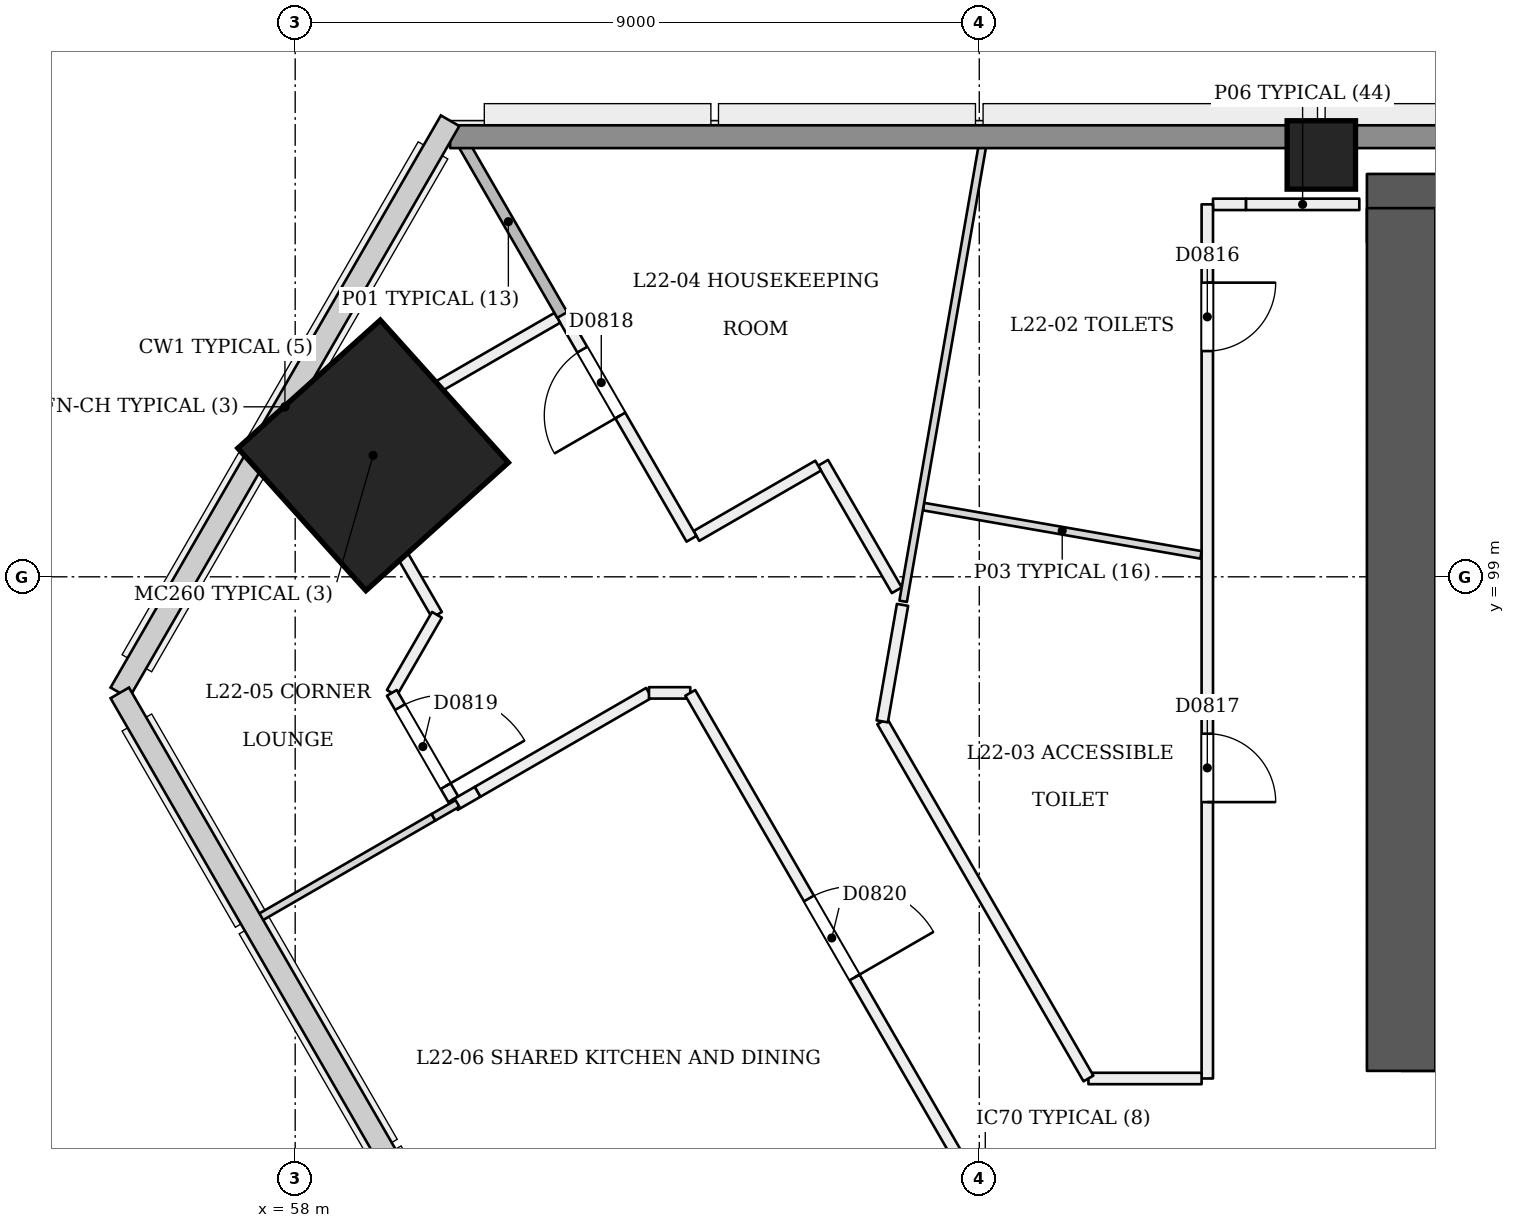
"""IFC4 building model, lengths in metres.
Left out: names, types, materials, properties, quantities, classifications, styles, units other than length and angle.
Written with IfcOpenShell. Run it as: python <this file> out.ifc"""

import sys

from ifc_helpers import new_model, si_unit, direction, frame, frame_2d, origin, origin_2d, place, context, subcontext, project, spatial, rectangle, extrude, element, fill, save


model = new_model("IFC4")
c1 = context("Model", 3, precision=1e-05, world=origin(), true_north=direction((0.0, 1.0)))
c2 = subcontext(c1, "Body", "Model", "MODEL_VIEW")
j1 = project(units=[si_unit("LENGTHUNIT", "METRE"), si_unit("PLANEANGLEUNIT", "RADIAN")], contexts=[c1])
p1 = place(None, origin())
s1 = spatial("IfcSite", under=j1, at=p1, CompositionType="ELEMENT")
p2 = place(p1, origin())
s2 = spatial("IfcBuilding", under=s1, at=p2, CompositionType="ELEMENT")
p3 = place(p2, frame((0.0, 0.0, 88.2)))
s3 = spatial("IfcBuildingStorey", under=s2, at=p3, CompositionType="ELEMENT", Elevation=88.2)
p4 = place(p3, frame((72.55, 92.95, 0.0), z_axis=(0.0, 0.0, 1.0), x_axis=(1.0, 0.0, 0.0)))
e1 = element("IfcWall", 1, at=p4, inside=s3, PredefinedType="SHEAR", context=c2, shape_type="SweptSolid", body=[
    extrude(rectangle(XDim=25.35, YDim=0.9, at=frame_2d((12.675, 0.0))), origin(), (0.0, 0.0, 1.0), 3.6),
])
p5 = place(p4, frame((1.25, 0.0, 0.0)))
e2 = element("IfcOpeningElement", 2, at=p5, cuts=e1, PredefinedType="OPENING", context=c2, shape_type="SweptSolid", body=[
    extrude(rectangle(XDim=1.2, YDim=2.1, at=frame_2d((0.6, 1.05))), frame((0.0, 0.46, 0.0), z_axis=(0.0, -1.0, 0.0), x_axis=(1.0, 0.0, 0.0)), (0.0, 0.0, 1.0), 0.921),
])
p6 = place(p4, frame((3.45, 0.0, 0.0)))
e3 = element("IfcOpeningElement", 3, at=p6, cuts=e1, PredefinedType="OPENING", context=c2, shape_type="SweptSolid", body=[
    extrude(rectangle(XDim=1.2, YDim=2.1, at=frame_2d((0.6, 1.05))), frame((0.0, 0.46, 0.0), z_axis=(0.0, -1.0, 0.0), x_axis=(1.0, 0.0, 0.0)), (0.0, 0.0, 1.0), 0.921),
])
p7 = place(p4, frame((13.45, 0.0, 0.0)))
e4 = element("IfcOpeningElement", 4, at=p7, cuts=e1, PredefinedType="OPENING", context=c2, shape_type="SweptSolid", body=[
    extrude(rectangle(XDim=1.2, YDim=2.1, at=frame_2d((0.6, 1.05))), frame((0.0, 0.46, 0.0), z_axis=(0.0, -1.0, 0.0), x_axis=(1.0, 0.0, 0.0)), (0.0, 0.0, 1.0), 0.921),
])
p8 = place(p4, frame((15.712, 0.0, 0.0)))
e5 = element("IfcOpeningElement", 5, at=p8, cuts=e1, PredefinedType="OPENING", context=c2, shape_type="SweptSolid", body=[
    extrude(rectangle(XDim=1.0, YDim=2.1, at=frame_2d((0.5, 1.05))), frame((0.0, 0.46, 0.0), z_axis=(0.0, -1.0, 0.0), x_axis=(1.0, 0.0, 0.0)), (0.0, 0.0, 1.0), 0.921),
])
p9 = place(p4, frame((18.35, 0.0, 0.0)))
e6 = element("IfcOpeningElement", 6, at=p9, cuts=e1, PredefinedType="OPENING", context=c2, shape_type="SweptSolid", body=[
    extrude(rectangle(XDim=1.0, YDim=2.1, at=frame_2d((0.5, 1.05))), frame((0.0, 0.46, 0.0), z_axis=(0.0, -1.0, 0.0), x_axis=(1.0, 0.0, 0.0)), (0.0, 0.0, 1.0), 0.921),
])
p10 = place(p4, frame((21.938, 0.0, 0.0)))
e7 = element("IfcOpeningElement", 7, at=p10, cuts=e1, PredefinedType="OPENING", context=c2, shape_type="SweptSolid", body=[
    extrude(rectangle(XDim=1.0, YDim=2.1, at=frame_2d((0.5, 1.05))), frame((0.0, 0.46, 0.0), z_axis=(0.0, -1.0, 0.0), x_axis=(1.0, 0.0, 0.0)), (0.0, 0.0, 1.0), 0.921),
])
p11 = place(p3, frame((97.45, 103.85, 0.0), z_axis=(0.0, 0.0, 1.0), x_axis=(-1.0, 0.0, 0.0)))
e8 = element("IfcWall", 8, at=p11, inside=s3, PredefinedType="SHEAR", context=c2, shape_type="SweptSolid", body=[
    extrude(rectangle(XDim=25.35, YDim=0.9, at=frame_2d((12.675, 0.0))), origin(), (0.0, 0.0, 1.0), 3.6),
])
p12 = place(p3, frame((72.55, 103.85, 0.0), z_axis=(0.0, 0.0, 1.0), x_axis=(0.0, -1.0, 0.0)))
e9 = element("IfcWall", 9, at=p12, inside=s3, PredefinedType="SHEAR", context=c2, shape_type="SweptSolid", body=[
    extrude(rectangle(XDim=11.35, YDim=0.9, at=frame_2d((5.675, 0.0))), origin(), (0.0, 0.0, 1.0), 3.6),
])
p13 = place(p3, frame((58.991, 100.586, 0.0), z_axis=(0.028401796786, 0.009286506348, 0.999553449666), x_axis=(-0.86620189855, 0.499294816778, 0.019973905167)))
e10 = element("IfcColumn", 10, at=p13, inside=s3, PredefinedType="COLUMN", context=c2, shape_type="SweptSolid", body=[
    extrude(rectangle(XDim=2.52, YDim=2.52, at=origin_2d()), origin(), (0.0, 0.0, 1.0), 3.602),
])
p14 = place(p3, frame((71.5, 104.55, 0.0), z_axis=(0.0, 0.0, 1.0), x_axis=(1.0, 0.0, 0.0)))
e11 = element("IfcColumn", 11, at=p14, inside=s3, PredefinedType="COLUMN", context=c2, shape_type="SweptSolid", body=[
    extrude(rectangle(XDim=0.9, YDim=0.9, at=origin_2d()), origin(), (0.0, 0.0, 1.0), 3.6),
])
p15 = place(p3, frame((72.0, 103.9, 0.0), z_axis=(0.0, 0.0, 1.0), x_axis=(-1.0, 0.0, 0.0)))
e12 = element("IfcWall", 12, at=p15, inside=s3, PredefinedType="PARTITIONING", context=c2, shape_type="SweptSolid", body=[
    extrude(rectangle(XDim=1.492, YDim=0.15, at=frame_2d((0.746, 0.0))), origin(), (0.0, 0.0, 1.0), 3.1),
])
p16 = place(p3, frame((70.508, 103.9, 0.0), z_axis=(0.0, 0.0, 1.0), x_axis=(-1.0, 0.0, 0.0)))
e13 = element("IfcWall", 13, at=p16, inside=s3, PredefinedType="PARTITIONING", context=c2, shape_type="SweptSolid", body=[
    extrude(rectangle(XDim=0.433, YDim=0.15, at=frame_2d((0.216, 0.0))), origin(), (0.0, 0.0, 1.0), 2.6),
])
p17 = place(p3, frame((70.0, 103.9, 0.0), z_axis=(0.0, 0.0, 1.0), x_axis=(0.0, -1.0, 0.0)))
e14 = element("IfcWall", 14, at=p17, inside=s3, PredefinedType="PARTITIONING", context=c2, shape_type="SweptSolid", body=[
    extrude(rectangle(XDim=11.5, YDim=0.15, at=frame_2d((5.75, 0.0))), origin(), (0.0, 0.0, 1.0), 2.6),
])
p18 = place(p17, frame((1.03, 0.0, 0.0)))
e15 = element("IfcOpeningElement", 15, at=p18, cuts=e14, PredefinedType="OPENING", context=c2, shape_type="SweptSolid", body=[
    extrude(rectangle(XDim=0.9, YDim=2.1, at=frame_2d((0.45, 1.05))), frame((0.0, 0.085, 0.0), z_axis=(0.0, -1.0, 0.0), x_axis=(1.0, 0.0, 0.0)), (0.0, 0.0, 1.0), 0.171),
])
p19 = place(p17, frame((6.964, 0.0, 0.0)))
e16 = element("IfcOpeningElement", 16, at=p19, cuts=e14, PredefinedType="OPENING", context=c2, shape_type="SweptSolid", body=[
    extrude(rectangle(XDim=0.9, YDim=2.1, at=frame_2d((0.45, 1.05))), frame((0.0, 0.085, 0.0), z_axis=(0.0, -1.0, 0.0), x_axis=(1.0, 0.0, 0.0)), (0.0, 0.0, 1.0), 0.171),
])
p20 = place(p3, frame((69.925, 92.4, 0.0), z_axis=(0.0, 0.0, 1.0), x_axis=(-1.0, 0.0, 0.0)))
e17 = element("IfcWall", 17, at=p20, inside=s3, PredefinedType="PARTITIONING", context=c2, shape_type="SweptSolid", body=[
    extrude(rectangle(XDim=1.489, YDim=0.15, at=frame_2d((0.745, 0.0))), origin(), (0.0, 0.0, 1.0), 3.1),
])
p21 = place(p3, frame((68.436, 92.4, 0.0), z_axis=(0.0, 0.0, 1.0), x_axis=(-0.499982159162, 0.866035703952, 0.0)))
e18 = element("IfcWall", 18, at=p21, inside=s3, PredefinedType="PARTITIONING", context=c2, shape_type="SweptSolid", body=[
    extrude(rectangle(XDim=5.425, YDim=0.15, at=frame_2d((2.712, 0.0))), origin(), (0.0, 0.0, 1.0), 3.1),
])
p22 = place(p3, frame((65.724, 97.098, 0.0), z_axis=(0.0, 0.0, 1.0), x_axis=(0.17154650213, 0.985176023666, 0.0)))
e19 = element("IfcWall", 19, at=p22, inside=s3, PredefinedType="PARTITIONING", context=c2, shape_type="SweptSolid", body=[
    extrude(rectangle(XDim=1.555, YDim=0.15, at=frame_2d((0.778, 0.0))), origin(), (0.0, 0.0, 1.0), 3.1),
])
p23 = place(p3, frame((65.915, 98.823, 0.0), z_axis=(0.0, 0.0, 1.0), x_axis=(-0.500449803305, 0.86576555393, 0.0)))
e20 = element("IfcWall", 20, at=p23, inside=s3, PredefinedType="PARTITIONING", context=c2, shape_type="SweptSolid", body=[
    extrude(rectangle(XDim=1.937, YDim=0.15, at=frame_2d((0.968, 0.0))), origin(), (0.0, 0.0, 1.0), 3.1),
])
p24 = place(p3, frame((64.881, 100.462, 0.0), z_axis=(0.0, 0.0, 1.0), x_axis=(-0.866058118026, -0.49994333299, 0.0)))
e21 = element("IfcWall", 21, at=p24, inside=s3, PredefinedType="PARTITIONING", context=c2, shape_type="SweptSolid", body=[
    extrude(rectangle(XDim=1.85, YDim=0.15, at=frame_2d((0.925, 0.0))), origin(), (0.0, 0.0, 1.0), 3.1),
])
p25 = place(p3, frame((63.214, 99.5, 0.0), z_axis=(0.0, 0.0, 1.0), x_axis=(-0.50003140069, 0.866007273829, 0.0)))
e22 = element("IfcWall", 22, at=p25, inside=s3, PredefinedType="PARTITIONING", context=c2, shape_type="SweptSolid", body=[
    extrude(rectangle(XDim=3.42, YDim=0.15, at=frame_2d((1.71, 0.0))), origin(), (0.0, 0.0, 1.0), 2.6),
])
p26 = place(p25, frame((1.873, 0.0, 0.0)))
e23 = element("IfcOpeningElement", 23, at=p26, cuts=e22, PredefinedType="OPENING", context=c2, shape_type="SweptSolid", body=[
    extrude(rectangle(XDim=1.0, YDim=2.1, at=frame_2d((0.5, 1.05))), frame((0.0, 0.085, 0.0), z_axis=(0.0, -1.0, 0.0), x_axis=(1.0, 0.0, 0.0)), (0.0, 0.0, 1.0), 0.171),
])
p27 = place(p3, frame((61.448, 102.407, 0.0), z_axis=(0.0, 0.0, 1.0), x_axis=(-0.866002163101, -0.500040251884, 0.0)))
e24 = element("IfcWall", 24, at=p27, inside=s3, PredefinedType="PARTITIONING", context=c2, shape_type="SweptSolid", body=[
    extrude(rectangle(XDim=3.325, YDim=0.15, at=frame_2d((1.663, 0.0))), origin(), (0.0, 0.0, 1.0), 3.1),
])
p28 = place(p3, frame((58.606, 100.679, 0.0), z_axis=(0.0, 0.0, 1.0), x_axis=(0.500072327845, -0.865983641256, 0.0)))
e25 = element("IfcWall", 25, at=p28, inside=s3, PredefinedType="PARTITIONING", context=c2, shape_type="SweptSolid", body=[
    extrude(rectangle(XDim=2.517, YDim=0.15, at=frame_2d((1.258, 0.0))), origin(), (0.0, 0.0, 1.0), 2.6),
])
p29 = place(p3, frame((59.865, 98.5, 0.0), z_axis=(0.0, 0.0, 1.0), x_axis=(-0.500013496215, -0.866017611601, 0.0)))
e26 = element("IfcWall", 26, at=p29, inside=s3, PredefinedType="PARTITIONING", context=c2, shape_type="SweptSolid", body=[
    extrude(rectangle(XDim=1.186, YDim=0.15, at=frame_2d((0.593, 0.0))), origin(), (0.0, 0.0, 1.0), 2.6),
])
p30 = place(p3, frame((59.272, 97.473, 0.0), z_axis=(0.0, 0.0, 1.0), x_axis=(0.500005767435, -0.866022073929, 0.0)))
e27 = element("IfcWall", 27, at=p30, inside=s3, PredefinedType="PARTITIONING", context=c2, shape_type="SweptSolid", body=[
    extrude(rectangle(XDim=1.616, YDim=0.15, at=frame_2d((0.808, 0.0))), origin(), (0.0, 0.0, 1.0), 2.6),
])
p31 = place(p30, frame((0.216, 0.0, 0.0)))
e28 = element("IfcOpeningElement", 28, at=p31, cuts=e27, PredefinedType="OPENING", context=c2, shape_type="SweptSolid", body=[
    extrude(rectangle(XDim=1.2, YDim=2.1, at=frame_2d((0.6, 1.05))), frame((0.0, 0.085, 0.0), z_axis=(0.0, -1.0, 0.0), x_axis=(1.0, 0.0, 0.0)), (0.0, 0.0, 1.0), 0.171),
])
p32 = place(p3, frame((60.1, 95.998, 0.0), z_axis=(0.0, 0.0, 1.0), x_axis=(0.866115353951, 0.499844169366, 0.0)))
e29 = element("IfcWall", 29, at=p32, inside=s3, PredefinedType="PARTITIONING", context=c2, shape_type="SweptSolid", body=[
    extrude(rectangle(XDim=0.347, YDim=0.15, at=frame_2d((0.174, 0.0))), origin(), (0.0, 0.0, 1.0), 2.6),
])
p33 = place(p3, frame((60.401, 96.172, 0.0), z_axis=(0.0, 0.0, 1.0), x_axis=(0.866023087339, 0.500004012181, 0.0)))
e30 = element("IfcWall", 30, at=p33, inside=s3, PredefinedType="PARTITIONING", context=c2, shape_type="SweptSolid", body=[
    extrude(rectangle(XDim=2.602, YDim=0.15, at=frame_2d((1.301, 0.0))), origin(), (0.0, 0.0, 1.0), 3.1),
])
p34 = place(p3, frame((62.654, 97.473, 0.0), z_axis=(0.0, 0.0, 1.0), x_axis=(1.0, 0.0, 0.0)))
e31 = element("IfcWall", 31, at=p34, inside=s3, PredefinedType="PARTITIONING", context=c2, shape_type="SweptSolid", body=[
    extrude(rectangle(XDim=0.544, YDim=0.15, at=frame_2d((0.272, 0.0))), origin(), (0.0, 0.0, 1.0), 3.1),
])
p35 = place(p3, frame((63.198, 97.473, 0.0), z_axis=(0.0, 0.0, 1.0), x_axis=(0.499996804348, -0.866027248787, 0.0)))
e32 = element("IfcWall", 32, at=p35, inside=s3, PredefinedType="PARTITIONING", context=c2, shape_type="SweptSolid", body=[
    extrude(rectangle(XDim=42.418, YDim=0.15, at=frame_2d((21.209, 0.0))), origin(), (0.0, 0.0, 1.0), 2.7),
])
p36 = place(p35, frame((3.123, 0.0, 0.0)))
e33 = element("IfcOpeningElement", 33, at=p36, cuts=e32, PredefinedType="OPENING", context=c2, shape_type="SweptSolid", body=[
    extrude(rectangle(XDim=1.2, YDim=2.1, at=frame_2d((0.6, 1.05))), frame((0.0, 0.085, 0.0), z_axis=(0.0, -1.0, 0.0), x_axis=(1.0, 0.0, 0.0)), (0.0, 0.0, 1.0), 0.171),
])
p37 = place(p35, frame((10.538, 0.0, 0.0)))
e34 = element("IfcOpeningElement", 34, at=p37, cuts=e32, PredefinedType="OPENING", context=c2, shape_type="SweptSolid", body=[
    extrude(rectangle(XDim=1.1, YDim=2.1, at=frame_2d((0.55, 1.05))), frame((0.0, 0.085, 0.0), z_axis=(0.0, -1.0, 0.0), x_axis=(1.0, 0.0, 0.0)), (0.0, 0.0, 1.0), 0.171),
])
p38 = place(p35, frame((12.814, 0.0, 0.0)))
e35 = element("IfcOpeningElement", 35, at=p38, cuts=e32, PredefinedType="OPENING", context=c2, shape_type="SweptSolid", body=[
    extrude(rectangle(XDim=1.0, YDim=2.1, at=frame_2d((0.5, 1.05))), frame((0.0, 0.085, 0.0), z_axis=(0.0, -1.0, 0.0), x_axis=(1.0, 0.0, 0.0)), (0.0, 0.0, 1.0), 0.171),
])
p39 = place(p35, frame((20.609, 0.0, 0.0)))
e36 = element("IfcOpeningElement", 36, at=p39, cuts=e32, PredefinedType="OPENING", context=c2, shape_type="SweptSolid", body=[
    extrude(rectangle(XDim=1.2, YDim=2.1, at=frame_2d((0.6, 1.05))), frame((0.0, 0.085, 0.0), z_axis=(0.0, -1.0, 0.0), x_axis=(1.0, 0.0, 0.0)), (0.0, 0.0, 1.0), 0.171),
])
p40 = place(p35, frame((27.459, 0.0, 0.0)))
e37 = element("IfcOpeningElement", 37, at=p40, cuts=e32, PredefinedType="OPENING", context=c2, shape_type="SweptSolid", body=[
    extrude(rectangle(XDim=1.0, YDim=2.1, at=frame_2d((0.5, 1.05))), frame((0.0, 0.085, 0.0), z_axis=(0.0, -1.0, 0.0), x_axis=(1.0, 0.0, 0.0)), (0.0, 0.0, 1.0), 0.171),
])
p41 = place(p35, frame((31.959, 0.0, 0.0)))
e38 = element("IfcOpeningElement", 38, at=p41, cuts=e32, PredefinedType="OPENING", context=c2, shape_type="SweptSolid", body=[
    extrude(rectangle(XDim=1.0, YDim=2.1, at=frame_2d((0.5, 1.05))), frame((0.0, 0.085, 0.0), z_axis=(0.0, -1.0, 0.0), x_axis=(1.0, 0.0, 0.0)), (0.0, 0.0, 1.0), 0.171),
])
p42 = place(p35, frame((40.905, 0.0, 0.0)))
e39 = element("IfcOpeningElement", 39, at=p42, cuts=e32, PredefinedType="OPENING", context=c2, shape_type="SweptSolid", body=[
    extrude(rectangle(XDim=1.2, YDim=2.1, at=frame_2d((0.6, 1.05))), frame((0.0, 0.085, 0.0), z_axis=(0.0, -1.0, 0.0), x_axis=(1.0, 0.0, 0.0)), (0.0, 0.0, 1.0), 0.171),
])
p43 = place(p3, frame((66.266, 99.924, 0.0), z_axis=(0.0, 0.0, 1.0), x_axis=(0.985204499865, -0.17138288551, 0.0)))
e40 = element("IfcWall", 40, at=p43, inside=s3, PredefinedType="PARTITIONING", context=c2, shape_type="SweptSolid", body=[
    extrude(rectangle(XDim=3.705, YDim=0.1, at=frame_2d((1.853, 0.0))), origin(), (0.0, 0.0, 1.0), 3.1),
])
p44 = place(p3, frame((67.081, 104.9, 0.0), z_axis=(0.0, 0.0, 1.0), x_axis=(-0.171447216637, -0.985193306873, 0.0)))
e41 = element("IfcWall", 41, at=p44, inside=s3, PredefinedType="PARTITIONING", context=c2, shape_type="SweptSolid", body=[
    extrude(rectangle(XDim=6.315, YDim=0.1, at=frame_2d((3.158, 0.0))), origin(), (0.0, 0.0, 1.0), 2.6),
])
p45 = place(p3, frame((60.096, 104.9, 0.0), z_axis=(0.0, 0.0, 1.0), x_axis=(0.500037995954, -0.866003465699, 0.0)))
e42 = element("IfcWall", 42, at=p45, inside=s3, PredefinedType="PARTITIONING", context=c2, shape_type="SweptSolid", body=[
    extrude(rectangle(XDim=2.835, YDim=0.15, at=frame_2d((1.417, 0.0))), origin(), (0.0, 0.0, 1.0), 3.1),
])
p46 = place(p3, frame((57.502, 94.498, 0.0), z_axis=(0.0, 0.0, 1.0), x_axis=(0.866033651025, 0.499985715088, 0.0)))
e43 = element("IfcWall", 43, at=p46, inside=s3, PredefinedType="PARTITIONING", context=c2, shape_type="SweptSolid", body=[
    extrude(rectangle(XDim=2.676, YDim=0.1, at=frame_2d((1.338, 0.0))), origin(), (0.0, 0.0, 1.0), 3.1),
])
p47 = place(p3, frame((59.819, 95.836, 0.0), z_axis=(0.0, 0.0, 1.0), x_axis=(0.866006986733, 0.500031897912, 0.0)))
e44 = element("IfcWall", 44, at=p47, inside=s3, PredefinedType="PARTITIONING", context=c2, shape_type="SweptSolid", body=[
    extrude(rectangle(XDim=0.364, YDim=0.1, at=frame_2d((0.182, 0.0))), origin(), (0.0, 0.0, 1.0), 2.6),
])
p48 = place(p3, frame((60.038, 104.79, 0.0), z_axis=(0.0, 0.0, 1.0), x_axis=(1.0, 0.0, 0.0)))
e45 = element("IfcWall", 45, at=p48, inside=s3, PredefinedType="SOLIDWALL", context=c2, shape_type="SweptSolid", body=[
    extrude(rectangle(XDim=49.924, YDim=0.3, at=frame_2d((24.962, 0.0))), origin(), (0.0, 0.0, 1.0), 2.6),
])
p49 = place(p18, origin())
e46 = element("IfcDoor", 46, at=p49, inside=s3, OperationType="SINGLE_SWING_LEFT", PredefinedType="NOTDEFINED", context=c2, shape_type="SweptSolid", body=[
    extrude(rectangle(XDim=0.9, YDim=2.1, at=frame_2d((0.45, 1.05))), frame((0.0, 0.025, 0.0), z_axis=(0.0, -1.0, 0.0), x_axis=(1.0, 0.0, 0.0)), (0.0, 0.0, 1.0), 0.05),
])
fill(e15, e46)
p50 = place(p19, origin())
e47 = element("IfcDoor", 47, at=p50, inside=s3, OperationType="SINGLE_SWING_RIGHT", PredefinedType="NOTDEFINED", context=c2, shape_type="SweptSolid", body=[
    extrude(rectangle(XDim=0.9, YDim=2.1, at=frame_2d((0.45, 1.05))), frame((0.0, 0.025, 0.0), z_axis=(0.0, -1.0, 0.0), x_axis=(1.0, 0.0, 0.0)), (0.0, 0.0, 1.0), 0.05),
])
fill(e16, e47)
p51 = place(p26, origin())
e48 = element("IfcDoor", 48, at=p51, inside=s3, OperationType="SINGLE_SWING_LEFT", PredefinedType="NOTDEFINED", context=c2, shape_type="SweptSolid", body=[
    extrude(rectangle(XDim=1.0, YDim=2.1, at=frame_2d((0.5, 1.05))), frame((0.0, 0.025, 0.0), z_axis=(0.0, -1.0, 0.0), x_axis=(1.0, 0.0, 0.0)), (0.0, 0.0, 1.0), 0.05),
])
fill(e23, e48)
p52 = place(p31, origin())
e49 = element("IfcDoor", 49, at=p52, inside=s3, OperationType="SINGLE_SWING_RIGHT", PredefinedType="NOTDEFINED", context=c2, shape_type="SweptSolid", body=[
    extrude(rectangle(XDim=1.2, YDim=2.1, at=frame_2d((0.6, 1.05))), frame((0.0, 0.025, 0.0), z_axis=(0.0, -1.0, 0.0), x_axis=(1.0, 0.0, 0.0)), (0.0, 0.0, 1.0), 0.05),
])
fill(e28, e49)
p53 = place(p36, origin())
e50 = element("IfcDoor", 50, at=p53, inside=s3, OperationType="SINGLE_SWING_RIGHT", PredefinedType="NOTDEFINED", context=c2, shape_type="SweptSolid", body=[
    extrude(rectangle(XDim=1.2, YDim=2.1, at=frame_2d((0.6, 1.05))), frame((0.0, 0.025, 0.0), z_axis=(0.0, -1.0, 0.0), x_axis=(1.0, 0.0, 0.0)), (0.0, 0.0, 1.0), 0.05),
])
fill(e33, e50)
save(model, sys.argv[1])
